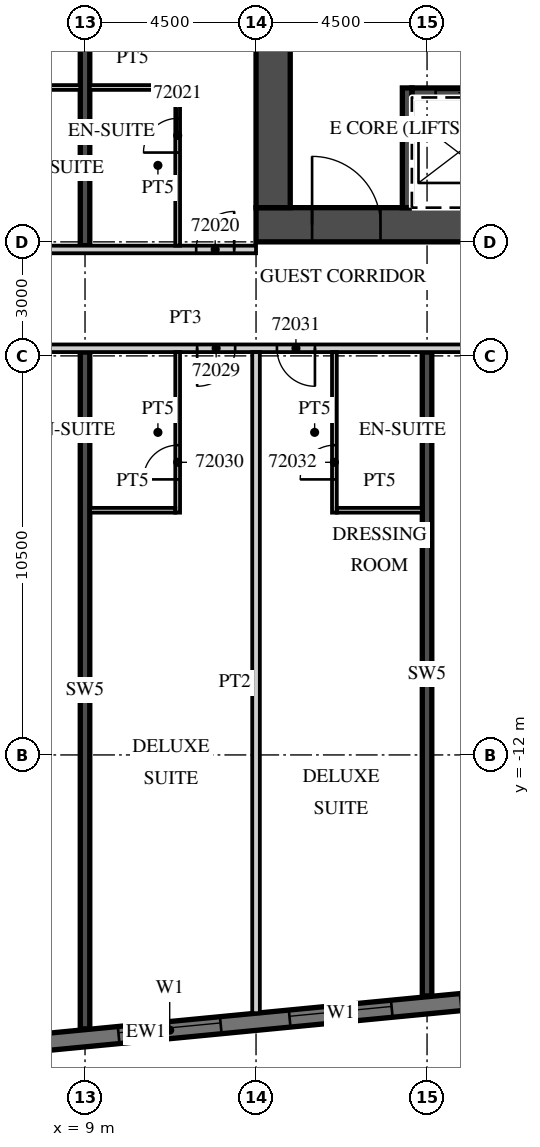
"""IFC4 building model, lengths in metres.
Left out: names, types, materials, properties, quantities, classifications, styles, units other than length and angle.
Written with IfcOpenShell. Run it as: python <this file> out.ifc"""

import sys

from ifc_helpers import new_model, si_unit, direction, frame, frame_2d, origin, place, context, subcontext, project, spatial, rectangle, extrude, element, fill, save


model = new_model("IFC4")
c1 = context("Model", 3, precision=1e-05, world=origin(), true_north=direction((0.0, 1.0)))
c2 = subcontext(c1, "Body", "Model", "MODEL_VIEW")
j1 = project(units=[si_unit("LENGTHUNIT", "METRE"), si_unit("PLANEANGLEUNIT", "RADIAN")], contexts=[c1])
p1 = place(None, origin())
s1 = spatial("IfcSite", under=j1, at=p1, CompositionType="ELEMENT")
p2 = place(p1, origin())
s2 = spatial("IfcBuilding", under=s1, at=p2, CompositionType="ELEMENT")
p3 = place(p2, frame((0.0, 0.0, 288.3)))
s3 = spatial("IfcBuildingStorey", under=s2, at=p3, CompositionType="ELEMENT", Elevation=288.3)
p4 = place(p3, frame((9.0, -19.207, 0.0), z_axis=(0.0, 0.0, 1.0), x_axis=(0.0, 1.0, 0.0)))
e1 = element("IfcWall", 1, at=p4, inside=s3, PredefinedType="SHEAR", context=c2, shape_type="SweptSolid", body=[
    extrude(rectangle(XDim=17.807, YDim=0.25, at=frame_2d((8.904, 0.0))), origin(), (0.0, 0.0, 1.0), 3.3),
])
p5 = place(p3, frame((9.0, 1.4, 0.0), z_axis=(0.0, 0.0, 1.0), x_axis=(0.0, 1.0, 0.0)))
e2 = element("IfcWall", 2, at=p5, inside=s3, PredefinedType="SHEAR", context=c2, shape_type="SweptSolid", body=[
    extrude(rectangle(XDim=18.629, YDim=0.25, at=frame_2d((9.315, 0.0))), origin(), (0.0, 0.0, 1.0), 3.3),
])
p6 = place(p3, frame((18.0, -18.341, 0.0), z_axis=(0.0, 0.0, 1.0), x_axis=(0.0, 1.0, 0.0)))
e3 = element("IfcWall", 3, at=p6, inside=s3, PredefinedType="SHEAR", context=c2, shape_type="SweptSolid", body=[
    extrude(rectangle(XDim=16.941, YDim=0.25, at=frame_2d((8.47, 0.0))), origin(), (0.0, 0.0, 1.0), 3.3),
])
p7 = place(p3, frame((-13.521, -21.624, 0.0), z_axis=(0.0, 0.0, 1.0), x_axis=(0.995396186218, 0.095845878695, 0.0)))
e4 = element("IfcWall", 4, at=p7, inside=s3, PredefinedType="SOLIDWALL", context=c2, shape_type="SweptSolid", body=[
    extrude(rectangle(XDim=48.481, YDim=0.45, at=frame_2d((24.241, 0.0))), origin(), (0.0, 0.0, 1.0), 3.02),
])
p8 = place(p7, frame((0.91, 0.0, 0.45)))
e5 = element("IfcOpeningElement", 5, at=p8, cuts=e4, PredefinedType="OPENING", context=c2, shape_type="SweptSolid", body=[
    extrude(rectangle(XDim=2.7, YDim=2.25, at=frame_2d((1.35, 1.125))), frame((0.0, 0.235, 0.0), z_axis=(0.0, -1.0, 0.0), x_axis=(1.0, 0.0, 0.0)), (0.0, 0.0, 1.0), 0.47),
])
p9 = place(p7, frame((5.431, 0.0, 0.45)))
e6 = element("IfcOpeningElement", 6, at=p9, cuts=e4, PredefinedType="OPENING", context=c2, shape_type="SweptSolid", body=[
    extrude(rectangle(XDim=2.7, YDim=2.25, at=frame_2d((1.35, 1.125))), frame((0.0, 0.235, 0.0), z_axis=(0.0, -1.0, 0.0), x_axis=(1.0, 0.0, 0.0)), (0.0, 0.0, 1.0), 0.47),
])
p10 = place(p7, frame((9.952, 0.0, 0.45)))
e7 = element("IfcOpeningElement", 7, at=p10, cuts=e4, PredefinedType="OPENING", context=c2, shape_type="SweptSolid", body=[
    extrude(rectangle(XDim=2.7, YDim=2.25, at=frame_2d((1.35, 1.125))), frame((0.0, 0.235, 0.0), z_axis=(0.0, -1.0, 0.0), x_axis=(1.0, 0.0, 0.0)), (0.0, 0.0, 1.0), 0.47),
])
p11 = place(p7, frame((14.473, 0.0, 0.45)))
e8 = element("IfcOpeningElement", 8, at=p11, cuts=e4, PredefinedType="OPENING", context=c2, shape_type="SweptSolid", body=[
    extrude(rectangle(XDim=2.7, YDim=2.25, at=frame_2d((1.35, 1.125))), frame((0.0, 0.235, 0.0), z_axis=(0.0, -1.0, 0.0), x_axis=(1.0, 0.0, 0.0)), (0.0, 0.0, 1.0), 0.47),
])
p12 = place(p7, frame((18.994, 0.0, 0.45)))
e9 = element("IfcOpeningElement", 9, at=p12, cuts=e4, PredefinedType="OPENING", context=c2, shape_type="SweptSolid", body=[
    extrude(rectangle(XDim=2.7, YDim=2.25, at=frame_2d((1.35, 1.125))), frame((0.0, 0.235, 0.0), z_axis=(0.0, -1.0, 0.0), x_axis=(1.0, 0.0, 0.0)), (0.0, 0.0, 1.0), 0.47),
])
p13 = place(p7, frame((23.514, 0.0, 0.45)))
e10 = element("IfcOpeningElement", 10, at=p13, cuts=e4, PredefinedType="OPENING", context=c2, shape_type="SweptSolid", body=[
    extrude(rectangle(XDim=2.7, YDim=2.25, at=frame_2d((1.35, 1.125))), frame((0.0, 0.235, 0.0), z_axis=(0.0, -1.0, 0.0), x_axis=(1.0, 0.0, 0.0)), (0.0, 0.0, 1.0), 0.47),
])
p14 = place(p7, frame((28.035, 0.0, 0.45)))
e11 = element("IfcOpeningElement", 11, at=p14, cuts=e4, PredefinedType="OPENING", context=c2, shape_type="SweptSolid", body=[
    extrude(rectangle(XDim=2.7, YDim=2.25, at=frame_2d((1.35, 1.125))), frame((0.0, 0.235, 0.0), z_axis=(0.0, -1.0, 0.0), x_axis=(1.0, 0.0, 0.0)), (0.0, 0.0, 1.0), 0.47),
])
p15 = place(p7, frame((32.556, 0.0, 0.45)))
e12 = element("IfcOpeningElement", 12, at=p15, cuts=e4, PredefinedType="OPENING", context=c2, shape_type="SweptSolid", body=[
    extrude(rectangle(XDim=2.7, YDim=2.25, at=frame_2d((1.35, 1.125))), frame((0.0, 0.235, 0.0), z_axis=(0.0, -1.0, 0.0), x_axis=(1.0, 0.0, 0.0)), (0.0, 0.0, 1.0), 0.47),
])
p16 = place(p7, frame((37.077, 0.0, 0.45)))
e13 = element("IfcOpeningElement", 13, at=p16, cuts=e4, PredefinedType="OPENING", context=c2, shape_type="SweptSolid", body=[
    extrude(rectangle(XDim=2.7, YDim=2.25, at=frame_2d((1.35, 1.125))), frame((0.0, 0.235, 0.0), z_axis=(0.0, -1.0, 0.0), x_axis=(1.0, 0.0, 0.0)), (0.0, 0.0, 1.0), 0.47),
])
p17 = place(p7, frame((41.598, 0.0, 0.45)))
e14 = element("IfcOpeningElement", 14, at=p17, cuts=e4, PredefinedType="OPENING", context=c2, shape_type="SweptSolid", body=[
    extrude(rectangle(XDim=2.7, YDim=2.25, at=frame_2d((1.35, 1.125))), frame((0.0, 0.235, 0.0), z_axis=(0.0, -1.0, 0.0), x_axis=(1.0, 0.0, 0.0)), (0.0, 0.0, 1.0), 0.47),
])
p18 = place(p3, frame((-39.909, 1.3, 0.0), z_axis=(0.0, 0.0, 1.0), x_axis=(1.0, 0.0, 0.0)))
e15 = element("IfcWall", 15, at=p18, inside=s3, PredefinedType="PARTITIONING", context=c2, shape_type="SweptSolid", body=[
    extrude(rectangle(XDim=53.409, YDim=0.2, at=frame_2d((26.705, 0.0))), origin(), (0.0, 0.0, 1.0), 3.02),
])
p19 = place(p18, frame((0.255, 0.0, 0.0)))
e16 = element("IfcOpeningElement", 16, at=p19, cuts=e15, PredefinedType="OPENING", context=c2, shape_type="SweptSolid", body=[
    extrude(rectangle(XDim=0.9, YDim=2.1, at=frame_2d((0.45, 1.05))), frame((0.0, 0.11, 0.0), z_axis=(0.0, -1.0, 0.0), x_axis=(1.0, 0.0, 0.0)), (0.0, 0.0, 1.0), 0.22),
])
p20 = place(p18, frame((6.347, 0.0, 0.0)))
e17 = element("IfcOpeningElement", 17, at=p20, cuts=e15, PredefinedType="OPENING", context=c2, shape_type="SweptSolid", body=[
    extrude(rectangle(XDim=1.2, YDim=2.1, at=frame_2d((0.6, 1.05))), frame((0.0, 0.11, 0.0), z_axis=(0.0, -1.0, 0.0), x_axis=(1.0, 0.0, 0.0)), (0.0, 0.0, 1.0), 0.22),
])
p21 = place(p18, frame((13.484, 0.0, 0.0)))
e18 = element("IfcOpeningElement", 18, at=p21, cuts=e15, PredefinedType="OPENING", context=c2, shape_type="SweptSolid", body=[
    extrude(rectangle(XDim=1.0, YDim=2.1, at=frame_2d((0.5, 1.05))), frame((0.0, 0.11, 0.0), z_axis=(0.0, -1.0, 0.0), x_axis=(1.0, 0.0, 0.0)), (0.0, 0.0, 1.0), 0.22),
])
p22 = place(p18, frame((20.334, 0.0, 0.0)))
e19 = element("IfcOpeningElement", 19, at=p22, cuts=e15, PredefinedType="OPENING", context=c2, shape_type="SweptSolid", body=[
    extrude(rectangle(XDim=1.0, YDim=2.1, at=frame_2d((0.5, 1.05))), frame((0.0, 0.11, 0.0), z_axis=(0.0, -1.0, 0.0), x_axis=(1.0, 0.0, 0.0)), (0.0, 0.0, 1.0), 0.22),
])
p23 = place(p18, frame((22.484, 0.0, 0.0)))
e20 = element("IfcOpeningElement", 20, at=p23, cuts=e15, PredefinedType="OPENING", context=c2, shape_type="SweptSolid", body=[
    extrude(rectangle(XDim=1.0, YDim=2.1, at=frame_2d((0.5, 1.05))), frame((0.0, 0.11, 0.0), z_axis=(0.0, -1.0, 0.0), x_axis=(1.0, 0.0, 0.0)), (0.0, 0.0, 1.0), 0.22),
])
p24 = place(p18, frame((26.959, 0.0, 0.0)))
e21 = element("IfcOpeningElement", 21, at=p24, cuts=e15, PredefinedType="OPENING", context=c2, shape_type="SweptSolid", body=[
    extrude(rectangle(XDim=1.0, YDim=2.1, at=frame_2d((0.5, 1.05))), frame((0.0, 0.11, 0.0), z_axis=(0.0, -1.0, 0.0), x_axis=(1.0, 0.0, 0.0)), (0.0, 0.0, 1.0), 0.22),
])
p25 = place(p18, frame((36.271, 0.0, 0.0)))
e22 = element("IfcOpeningElement", 22, at=p25, cuts=e15, PredefinedType="OPENING", context=c2, shape_type="SweptSolid", body=[
    extrude(rectangle(XDim=1.2, YDim=2.1, at=frame_2d((0.6, 1.05))), frame((0.0, 0.11, 0.0), z_axis=(0.0, -1.0, 0.0), x_axis=(1.0, 0.0, 0.0)), (0.0, 0.0, 1.0), 0.22),
])
p26 = place(p18, frame((40.484, 0.0, 0.0)))
e23 = element("IfcOpeningElement", 23, at=p26, cuts=e15, PredefinedType="OPENING", context=c2, shape_type="SweptSolid", body=[
    extrude(rectangle(XDim=1.0, YDim=2.1, at=frame_2d((0.5, 1.05))), frame((0.0, 0.11, 0.0), z_axis=(0.0, -1.0, 0.0), x_axis=(1.0, 0.0, 0.0)), (0.0, 0.0, 1.0), 0.22),
])
p27 = place(p18, frame((44.959, 0.0, 0.0)))
e24 = element("IfcOpeningElement", 24, at=p27, cuts=e15, PredefinedType="OPENING", context=c2, shape_type="SweptSolid", body=[
    extrude(rectangle(XDim=1.0, YDim=2.1, at=frame_2d((0.5, 1.05))), frame((0.0, 0.11, 0.0), z_axis=(0.0, -1.0, 0.0), x_axis=(1.0, 0.0, 0.0)), (0.0, 0.0, 1.0), 0.22),
])
p28 = place(p18, frame((51.834, 0.0, 0.0)))
e25 = element("IfcOpeningElement", 25, at=p28, cuts=e15, PredefinedType="OPENING", context=c2, shape_type="SweptSolid", body=[
    extrude(rectangle(XDim=1.0, YDim=2.1, at=frame_2d((0.5, 1.05))), frame((0.0, 0.11, 0.0), z_axis=(0.0, -1.0, 0.0), x_axis=(1.0, 0.0, 0.0)), (0.0, 0.0, 1.0), 0.22),
])
p29 = place(p3, frame((6.625, 5.562, 0.0), z_axis=(0.0, 0.0, 1.0), x_axis=(1.0, 0.0, 0.0)))
e26 = element("IfcWall", 26, at=p29, inside=s3, PredefinedType="PARTITIONING", context=c2, shape_type="SweptSolid", body=[
    extrude(rectangle(XDim=2.25, YDim=0.125, at=frame_2d((1.125, 0.0))), origin(), (0.0, 0.0, 1.0), 3.02),
])
p30 = place(p3, frame((11.438, 1.4, 0.0), z_axis=(0.0, 0.0, 1.0), x_axis=(0.0, 1.0, 0.0)))
e27 = element("IfcWall", 27, at=p30, inside=s3, PredefinedType="PARTITIONING", context=c2, shape_type="SweptSolid", body=[
    extrude(rectangle(XDim=4.225, YDim=0.125, at=frame_2d((2.113, 0.0))), origin(), (0.0, 0.0, 1.0), 3.02),
])
p31 = place(p30, frame((2.45, 0.0, 0.0)))
e28 = element("IfcOpeningElement", 28, at=p31, cuts=e27, PredefinedType="OPENING", context=c2, shape_type="SweptSolid", body=[
    extrude(rectangle(XDim=0.9, YDim=2.1, at=frame_2d((0.45, 1.05))), frame((0.0, 0.073, 0.0), z_axis=(0.0, -1.0, 0.0), x_axis=(1.0, 0.0, 0.0)), (0.0, 0.0, 1.0), 0.145),
])
p32 = place(p3, frame((9.125, 5.562, 0.0), z_axis=(0.0, 0.0, 1.0), x_axis=(1.0, 0.0, 0.0)))
e29 = element("IfcWall", 29, at=p32, inside=s3, PredefinedType="PARTITIONING", context=c2, shape_type="SweptSolid", body=[
    extrude(rectangle(XDim=2.25, YDim=0.125, at=frame_2d((1.125, 0.0))), origin(), (0.0, 0.0, 1.0), 3.02),
])
p33 = place(p3, frame((-13.5, -1.3, 0.0), z_axis=(0.0, 0.0, 1.0), x_axis=(1.0, 0.0, 0.0)))
e30 = element("IfcWall", 30, at=p33, inside=s3, PredefinedType="PARTITIONING", context=c2, shape_type="SweptSolid", body=[
    extrude(rectangle(XDim=50.293, YDim=0.2, at=frame_2d((25.146, 0.0))), origin(), (0.0, 0.0, 1.0), 3.02),
])
p34 = place(p33, frame((0.575, 0.0, 0.0)))
e31 = element("IfcOpeningElement", 31, at=p34, cuts=e30, PredefinedType="OPENING", context=c2, shape_type="SweptSolid", body=[
    extrude(rectangle(XDim=1.0, YDim=2.1, at=frame_2d((0.5, 1.05))), frame((0.0, 0.11, 0.0), z_axis=(0.0, -1.0, 0.0), x_axis=(1.0, 0.0, 0.0)), (0.0, 0.0, 1.0), 0.22),
])
p35 = place(p33, frame((9.863, 0.0, 0.0)))
e32 = element("IfcOpeningElement", 32, at=p35, cuts=e30, PredefinedType="OPENING", context=c2, shape_type="SweptSolid", body=[
    extrude(rectangle(XDim=1.2, YDim=2.1, at=frame_2d((0.6, 1.05))), frame((0.0, 0.11, 0.0), z_axis=(0.0, -1.0, 0.0), x_axis=(1.0, 0.0, 0.0)), (0.0, 0.0, 1.0), 0.22),
])
p36 = place(p33, frame((18.862, 0.0, 0.0)))
e33 = element("IfcOpeningElement", 33, at=p36, cuts=e30, PredefinedType="OPENING", context=c2, shape_type="SweptSolid", body=[
    extrude(rectangle(XDim=1.2, YDim=2.1, at=frame_2d((0.6, 1.05))), frame((0.0, 0.11, 0.0), z_axis=(0.0, -1.0, 0.0), x_axis=(1.0, 0.0, 0.0)), (0.0, 0.0, 1.0), 0.22),
])
p37 = place(p33, frame((25.45, 0.0, 0.0)))
e34 = element("IfcOpeningElement", 34, at=p37, cuts=e30, PredefinedType="OPENING", context=c2, shape_type="SweptSolid", body=[
    extrude(rectangle(XDim=1.0, YDim=2.1, at=frame_2d((0.5, 1.05))), frame((0.0, 0.11, 0.0), z_axis=(0.0, -1.0, 0.0), x_axis=(1.0, 0.0, 0.0)), (0.0, 0.0, 1.0), 0.22),
])
p38 = place(p33, frame((27.55, 0.0, 0.0)))
e35 = element("IfcOpeningElement", 35, at=p38, cuts=e30, PredefinedType="OPENING", context=c2, shape_type="SweptSolid", body=[
    extrude(rectangle(XDim=1.0, YDim=2.1, at=frame_2d((0.5, 1.05))), frame((0.0, 0.11, 0.0), z_axis=(0.0, -1.0, 0.0), x_axis=(1.0, 0.0, 0.0)), (0.0, 0.0, 1.0), 0.22),
])
p39 = place(p33, frame((33.938, 0.0, 0.0)))
e36 = element("IfcOpeningElement", 36, at=p39, cuts=e30, PredefinedType="OPENING", context=c2, shape_type="SweptSolid", body=[
    extrude(rectangle(XDim=1.2, YDim=2.1, at=frame_2d((0.6, 1.05))), frame((0.0, 0.11, 0.0), z_axis=(0.0, -1.0, 0.0), x_axis=(1.0, 0.0, 0.0)), (0.0, 0.0, 1.0), 0.22),
])
p40 = place(p33, frame((42.938, 0.0, 0.0)))
e37 = element("IfcOpeningElement", 37, at=p40, cuts=e30, PredefinedType="OPENING", context=c2, shape_type="SweptSolid", body=[
    extrude(rectangle(XDim=1.2, YDim=2.1, at=frame_2d((0.6, 1.05))), frame((0.0, 0.11, 0.0), z_axis=(0.0, -1.0, 0.0), x_axis=(1.0, 0.0, 0.0)), (0.0, 0.0, 1.0), 0.22),
])
p41 = place(p3, frame((13.5, -18.796, 0.0), z_axis=(0.0, 0.0, 1.0), x_axis=(0.0, 1.0, 0.0)))
e38 = element("IfcWall", 38, at=p41, inside=s3, PredefinedType="PARTITIONING", context=c2, shape_type="SweptSolid", body=[
    extrude(rectangle(XDim=17.396, YDim=0.2, at=frame_2d((8.698, 0.0))), origin(), (0.0, 0.0, 1.0), 3.02),
])
p42 = place(p3, frame((11.438, -5.625, 0.0), z_axis=(0.0, 0.0, 1.0), x_axis=(0.0, 1.0, 0.0)))
e39 = element("IfcWall", 39, at=p42, inside=s3, PredefinedType="PARTITIONING", context=c2, shape_type="SweptSolid", body=[
    extrude(rectangle(XDim=4.225, YDim=0.125, at=frame_2d((2.113, 0.0))), origin(), (0.0, 0.0, 1.0), 3.02),
])
p43 = place(p42, frame((0.875, 0.0, 0.0)))
e40 = element("IfcOpeningElement", 40, at=p43, cuts=e39, PredefinedType="OPENING", context=c2, shape_type="SweptSolid", body=[
    extrude(rectangle(XDim=0.9, YDim=2.1, at=frame_2d((0.45, 1.05))), frame((0.0, 0.073, 0.0), z_axis=(0.0, -1.0, 0.0), x_axis=(1.0, 0.0, 0.0)), (0.0, 0.0, 1.0), 0.145),
])
p44 = place(p3, frame((9.125, -5.562, 0.0), z_axis=(0.0, 0.0, 1.0), x_axis=(1.0, 0.0, 0.0)))
e41 = element("IfcWall", 41, at=p44, inside=s3, PredefinedType="PARTITIONING", context=c2, shape_type="SweptSolid", body=[
    extrude(rectangle(XDim=2.25, YDim=0.125, at=frame_2d((1.125, 0.0))), origin(), (0.0, 0.0, 1.0), 3.02),
])
p45 = place(p3, frame((15.562, -5.625, 0.0), z_axis=(0.0, 0.0, 1.0), x_axis=(0.0, 1.0, 0.0)))
e42 = element("IfcWall", 42, at=p45, inside=s3, PredefinedType="PARTITIONING", context=c2, shape_type="SweptSolid", body=[
    extrude(rectangle(XDim=4.225, YDim=0.125, at=frame_2d((2.113, 0.0))), origin(), (0.0, 0.0, 1.0), 3.02),
])
p46 = place(p45, frame((0.875, 0.0, 0.0)))
e43 = element("IfcOpeningElement", 43, at=p46, cuts=e42, PredefinedType="OPENING", context=c2, shape_type="SweptSolid", body=[
    extrude(rectangle(XDim=0.9, YDim=2.1, at=frame_2d((0.45, 1.05))), frame((0.0, 0.073, 0.0), z_axis=(0.0, -1.0, 0.0), x_axis=(1.0, 0.0, 0.0)), (0.0, 0.0, 1.0), 0.145),
])
p47 = place(p3, frame((15.625, -5.562, 0.0), z_axis=(0.0, 0.0, 1.0), x_axis=(1.0, 0.0, 0.0)))
e44 = element("IfcWall", 44, at=p47, inside=s3, PredefinedType="PARTITIONING", context=c2, shape_type="SweptSolid", body=[
    extrude(rectangle(XDim=2.25, YDim=0.125, at=frame_2d((1.125, 0.0))), origin(), (0.0, 0.0, 1.0), 3.02),
])
p48 = place(p3, frame((13.5, 1.95, 0.0), z_axis=(0.0, 0.0, 1.0), x_axis=(1.0, 0.0, 0.0)))
e45 = element("IfcWall", 45, at=p48, inside=s3, PredefinedType="SHEAR", context=c2, shape_type="SweptSolid", body=[
    extrude(rectangle(XDim=18.0, YDim=0.9, at=frame_2d((9.0, 0.0))), origin(), (0.0, 0.0, 1.0), 3.02),
])
p49 = place(p48, frame((1.475, 0.0, 0.0)))
e46 = element("IfcOpeningElement", 46, at=p49, cuts=e45, PredefinedType="OPENING", context=c2, shape_type="SweptSolid", body=[
    extrude(rectangle(XDim=1.8, YDim=2.1, at=frame_2d((0.9, 1.05))), frame((0.0, 0.46, 0.0), z_axis=(0.0, -1.0, 0.0), x_axis=(1.0, 0.0, 0.0)), (0.0, 0.0, 1.0), 0.92),
])
p50 = place(p3, frame((13.95, 2.4, 0.0), z_axis=(0.0, 0.0, 1.0), x_axis=(0.0, 1.0, 0.0)))
e47 = element("IfcWall", 47, at=p50, inside=s3, PredefinedType="SHEAR", context=c2, shape_type="SweptSolid", body=[
    extrude(rectangle(XDim=12.2, YDim=0.9, at=frame_2d((6.1, 0.0))), origin(), (0.0, 0.0, 1.0), 3.02),
])
p51 = place(p3, frame((17.6, 5.425, 0.0), z_axis=(0.0, 0.0, 1.0), x_axis=(1.0, 0.0, 0.0)))
e48 = element("IfcWall", 48, at=p51, inside=s3, PredefinedType="SHEAR", context=c2, shape_type="SweptSolid", body=[
    extrude(rectangle(XDim=13.0, YDim=0.25, at=frame_2d((6.5, 0.0))), origin(), (0.0, 0.0, 1.0), 3.02),
])
p52 = place(p51, frame((3.275, 0.0, 0.0)))
e49 = element("IfcOpeningElement", 49, at=p52, cuts=e48, PredefinedType="OPENING", context=c2, shape_type="SweptSolid", body=[
    extrude(rectangle(XDim=1.2, YDim=2.1, at=frame_2d((0.6, 1.05))), frame((0.0, 0.135, 0.0), z_axis=(0.0, -1.0, 0.0), x_axis=(1.0, 0.0, 0.0)), (0.0, 0.0, 1.0), 0.27),
])
p53 = place(p51, frame((0.625, 0.0, 0.0)))
e50 = element("IfcOpeningElement", 50, at=p53, cuts=e48, PredefinedType="OPENING", context=c2, shape_type="SweptSolid", body=[
    extrude(rectangle(XDim=1.2, YDim=2.1, at=frame_2d((0.6, 1.05))), frame((0.0, 0.135, 0.0), z_axis=(0.0, -1.0, 0.0), x_axis=(1.0, 0.0, 0.0)), (0.0, 0.0, 1.0), 0.27),
])
p54 = place(p51, frame((7.275, 0.0, 0.0)))
e51 = element("IfcOpeningElement", 51, at=p54, cuts=e48, PredefinedType="OPENING", context=c2, shape_type="SweptSolid", body=[
    extrude(rectangle(XDim=1.0, YDim=2.1, at=frame_2d((0.5, 1.05))), frame((0.0, 0.135, 0.0), z_axis=(0.0, -1.0, 0.0), x_axis=(1.0, 0.0, 0.0)), (0.0, 0.0, 1.0), 0.27),
])
p55 = place(p3, frame((17.475, 2.4, 0.0), z_axis=(0.0, 0.0, 1.0), x_axis=(0.0, 1.0, 0.0)))
e52 = element("IfcWall", 52, at=p55, inside=s3, PredefinedType="SHEAR", context=c2, shape_type="SweptSolid", body=[
    extrude(rectangle(XDim=3.15, YDim=0.25, at=frame_2d((1.575, 0.0))), origin(), (0.0, 0.0, 1.0), 3.02),
])
p56 = place(p13, origin())
e53 = element("IfcWindow", 53, at=p56, inside=s3, PartitioningType="SINGLE_PANEL", PredefinedType="WINDOW", context=c2, shape_type="SweptSolid", body=[
    extrude(rectangle(XDim=2.7, YDim=2.25, at=frame_2d((1.35, 1.125))), frame((0.0, 0.09, 0.0), z_axis=(0.0, -1.0, 0.0), x_axis=(1.0, 0.0, 0.0)), (0.0, 0.0, 1.0), 0.06),
])
fill(e10, e53)
p57 = place(p14, origin())
e54 = element("IfcWindow", 54, at=p57, inside=s3, PartitioningType="SINGLE_PANEL", PredefinedType="WINDOW", context=c2, shape_type="SweptSolid", body=[
    extrude(rectangle(XDim=2.7, YDim=2.25, at=frame_2d((1.35, 1.125))), frame((0.0, 0.09, 0.0), z_axis=(0.0, -1.0, 0.0), x_axis=(1.0, 0.0, 0.0)), (0.0, 0.0, 1.0), 0.06),
])
fill(e11, e54)
p58 = place(p28, origin())
e55 = element("IfcDoor", 55, at=p58, inside=s3, OperationType="SINGLE_SWING_RIGHT", PredefinedType="DOOR", context=c2, shape_type="SweptSolid", body=[
    extrude(rectangle(XDim=1.0, YDim=2.1, at=frame_2d((0.5, 1.05))), frame((0.0, 0.025, 0.0), z_axis=(0.0, -1.0, 0.0), x_axis=(1.0, 0.0, 0.0)), (0.0, 0.0, 1.0), 0.05),
])
fill(e25, e55)
p59 = place(p31, origin())
e56 = element("IfcDoor", 56, at=p59, inside=s3, OperationType="SINGLE_SWING_LEFT", PredefinedType="DOOR", context=c2, shape_type="SweptSolid", body=[
    extrude(rectangle(XDim=0.9, YDim=2.1, at=frame_2d((0.45, 1.05))), frame((0.0, 0.025, 0.0), z_axis=(0.0, -1.0, 0.0), x_axis=(1.0, 0.0, 0.0)), (0.0, 0.0, 1.0), 0.05),
])
fill(e28, e56)
p60 = place(p37, origin())
e57 = element("IfcDoor", 57, at=p60, inside=s3, OperationType="SINGLE_SWING_LEFT", PredefinedType="DOOR", context=c2, shape_type="SweptSolid", body=[
    extrude(rectangle(XDim=1.0, YDim=2.1, at=frame_2d((0.5, 1.05))), frame((0.0, 0.025, 0.0), z_axis=(0.0, -1.0, 0.0), x_axis=(1.0, 0.0, 0.0)), (0.0, 0.0, 1.0), 0.05),
])
fill(e34, e57)
p61 = place(p43, origin())
e58 = element("IfcDoor", 58, at=p61, inside=s3, OperationType="SINGLE_SWING_LEFT", PredefinedType="DOOR", context=c2, shape_type="SweptSolid", body=[
    extrude(rectangle(XDim=0.9, YDim=2.1, at=frame_2d((0.45, 1.05))), frame((0.0, 0.025, 0.0), z_axis=(0.0, -1.0, 0.0), x_axis=(1.0, 0.0, 0.0)), (0.0, 0.0, 1.0), 0.05),
])
fill(e40, e58)
p62 = place(p38, origin())
e59 = element("IfcDoor", 59, at=p62, inside=s3, OperationType="SINGLE_SWING_RIGHT", PredefinedType="DOOR", context=c2, shape_type="SweptSolid", body=[
    extrude(rectangle(XDim=1.0, YDim=2.1, at=frame_2d((0.5, 1.05))), frame((0.0, 0.025, 0.0), z_axis=(0.0, -1.0, 0.0), x_axis=(1.0, 0.0, 0.0)), (0.0, 0.0, 1.0), 0.05),
])
fill(e35, e59)
p63 = place(p46, origin())
e60 = element("IfcDoor", 60, at=p63, inside=s3, OperationType="SINGLE_SWING_LEFT", PredefinedType="DOOR", context=c2, shape_type="SweptSolid", body=[
    extrude(rectangle(XDim=0.9, YDim=2.1, at=frame_2d((0.45, 1.05))), frame((0.0, 0.025, 0.0), z_axis=(0.0, -1.0, 0.0), x_axis=(1.0, 0.0, 0.0)), (0.0, 0.0, 1.0), 0.05),
])
fill(e43, e60)
p64 = place(p53, origin())
e61 = element("IfcDoor", 61, at=p64, inside=s3, OperationType="SLIDING_TO_LEFT", PredefinedType="DOOR", context=c2, shape_type="SweptSolid", body=[
    extrude(rectangle(XDim=1.2, YDim=2.1, at=frame_2d((0.6, 1.05))), frame((0.0, 0.025, 0.0), z_axis=(0.0, -1.0, 0.0), x_axis=(1.0, 0.0, 0.0)), (0.0, 0.0, 1.0), 0.05),
])
fill(e50, e61)
p65 = place(p49, origin())
e62 = element("IfcDoor", 62, at=p65, inside=s3, OperationType="DOUBLE_DOOR_DOUBLE_SWING", PredefinedType="DOOR", context=c2, shape_type="SweptSolid", body=[
    extrude(rectangle(XDim=1.8, YDim=2.1, at=frame_2d((0.9, 1.05))), frame((0.0, 0.025, 0.0), z_axis=(0.0, -1.0, 0.0), x_axis=(1.0, 0.0, 0.0)), (0.0, 0.0, 1.0), 0.05),
])
fill(e46, e62)
save(model, sys.argv[1])
